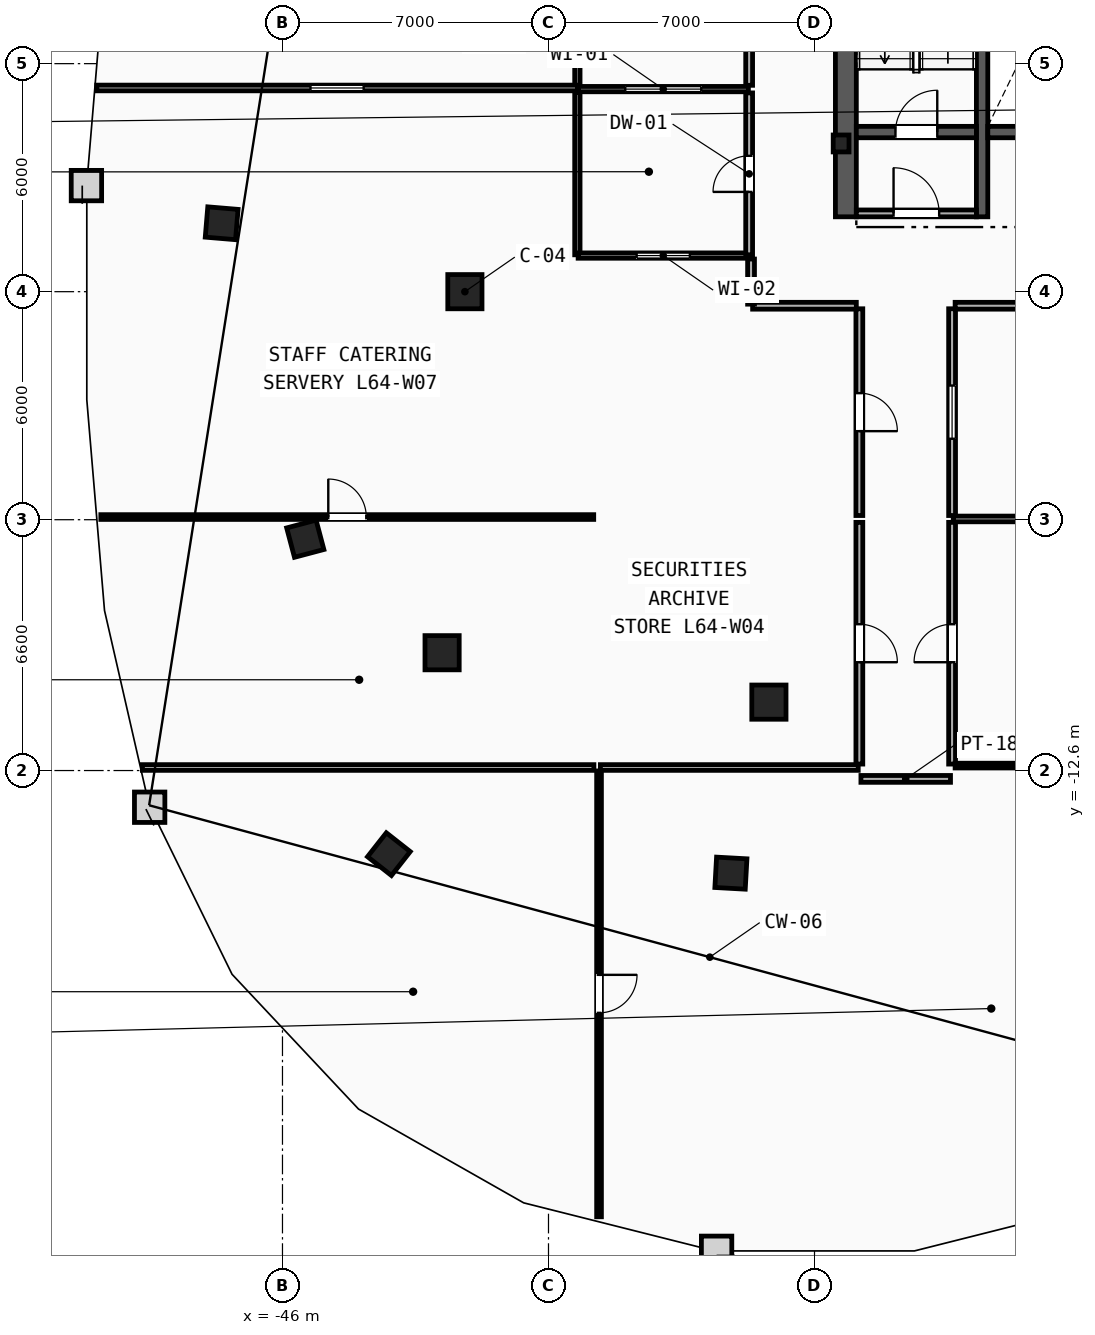
"""IFC4 building model, lengths in metres.
Left out: names, types, materials, properties, quantities, classifications, styles, units other than length and angle.
Written with IfcOpenShell. Run it as: python <this file> out.ifc"""

import sys

from ifc_helpers import new_model, si_unit, direction, frame, frame_2d, origin, origin_2d, place, context, subcontext, project, spatial, rectangle, i_section, extrude, element, fill, save


model = new_model("IFC4")
c1 = context("Model", 3, precision=1e-05, world=origin(), true_north=direction((0.0, 1.0)))
c2 = subcontext(c1, "Body", "Model", "MODEL_VIEW")
j1 = project(units=[si_unit("LENGTHUNIT", "METRE"), si_unit("PLANEANGLEUNIT", "RADIAN")], contexts=[c1])
p1 = place(None, origin())
s1 = spatial("IfcSite", under=j1, at=p1, CompositionType="ELEMENT")
p2 = place(p1, origin())
s2 = spatial("IfcBuilding", under=s1, at=p2, CompositionType="ELEMENT")
p3 = place(p2, frame((0.0, 0.0, 243.2)))
s3 = spatial("IfcBuildingStorey", under=s2, at=p3, CompositionType="ELEMENT", Elevation=243.2)
p4 = place(p3, frame((-31.3, 3.9, 0.0), z_axis=(0.0, 0.0, 1.0), x_axis=(1.0, 0.0, 0.0)))
e1 = element("IfcColumn", 1, at=p4, inside=s3, PredefinedType="COLUMN", context=c2, shape_type="SweptSolid", body=[
    extrude(i_section(OverallWidth=0.416, OverallDepth=0.446, WebThickness=0.039, FlangeThickness=0.063, FilletRadius=0.018, at=origin_2d()), origin(), (0.0, 0.0, 1.0), 3.6),
])
for number, where, z_axis, x_axis in (
    (2, (-41.2, 0.0, 0.0), (0.0, 0.0, 1.0), (1.0, 0.0, 0.0)),
    (3, (-41.8, -9.5, 0.0), (0.0, 0.0, 1.0), (1.0, 0.0, 0.0)),
    (4, (-33.2, -10.8, 0.0), (0.0, 0.0, 1.0), (1.0, 0.0, 0.0)),
):
    element("IfcColumn", number, at=place(p3, frame(where, z_axis=z_axis, x_axis=x_axis)), inside=s3, PredefinedType="COLUMN", context=c2, shape_type="SweptSolid", body=[
        extrude(rectangle(XDim=0.9, YDim=0.9, at=origin_2d()), origin(), (0.0, 0.0, 1.0), 3.6),
    ])
for number, where, z_axis, x_axis in (
    (5, (-47.6, 1.8, 0.0), (0.0, 0.0, 1.0), (-0.084, -0.997, 0.0)),
    (6, (-45.4, -6.5, 0.0), (0.0, 0.0, 1.0), (0.256, -0.967, 0.0)),
    (7, (-43.2, -14.8, 0.0), (0.0, 0.0, 1.0), (0.786, -0.618, 0.0)),
    (8, (-34.2, -15.3, 0.0), (0.0, 0.0, 1.0), (0.998, -0.055, 0.0)),
):
    element("IfcColumn", number, at=place(p3, frame(where, z_axis=z_axis, x_axis=x_axis)), inside=s3, PredefinedType="COLUMN", context=c2, shape_type="SweptSolid", body=[
        extrude(rectangle(XDim=0.8, YDim=0.8, at=origin_2d()), origin(), (0.0, 0.0, 1.0), 3.6),
    ])
p5 = place(p3, frame((-31.175, 1.97, 0.0), z_axis=(0.0, 0.0, 1.0), x_axis=(0.0, 1.0, 0.0)))
e9 = element("IfcWall", 9, at=p5, inside=s3, PredefinedType="SHEAR", context=c2, shape_type="SweptSolid", body=[
    extrude(rectangle(XDim=13.33, YDim=0.55, at=frame_2d((6.665, 0.0))), origin(), (0.0, 0.0, 1.0), 3.34),
])
p6 = place(p3, frame((-27.59, 1.97, 0.0), z_axis=(0.0, 0.0, 1.0), x_axis=(0.0, 1.0, 0.0)))
e10 = element("IfcWall", 10, at=p6, inside=s3, PredefinedType="SHEAR", context=c2, shape_type="SweptSolid", body=[
    extrude(rectangle(XDim=10.68, YDim=0.3, at=frame_2d((5.34, 0.0))), origin(), (0.0, 0.0, 1.0), 3.34),
])
p7 = place(p3, frame((-30.9, 4.2, 0.0), z_axis=(0.0, 0.0, 1.0), x_axis=(1.0, 0.0, 0.0)))
e11 = element("IfcWall", 11, at=p7, inside=s3, PredefinedType="SHEAR", context=c2, shape_type="SweptSolid", body=[
    extrude(rectangle(XDim=3.16, YDim=0.3, at=frame_2d((1.58, 0.0))), origin(), (0.0, 0.0, 1.0), 3.34),
])
p8 = place(p7, frame((1.03, 0.0, 0.0)))
e12 = element("IfcOpeningElement", 12, at=p8, cuts=e11, PredefinedType="OPENING", context=c2, shape_type="SweptSolid", body=[
    extrude(rectangle(XDim=1.1, YDim=2.15, at=frame_2d((0.55, 1.075))), frame((0.0, 0.16, 0.0), z_axis=(0.0, -1.0, 0.0), x_axis=(1.0, 0.0, 0.0)), (0.0, 0.0, 1.0), 0.32),
])
p9 = place(p3, frame((-27.44, 4.2, 0.0), z_axis=(0.0, 0.0, 1.0), x_axis=(1.0, 0.0, 0.0)))
e13 = element("IfcWall", 13, at=p9, inside=s3, PredefinedType="SHEAR", context=c2, shape_type="SweptSolid", body=[
    extrude(rectangle(XDim=3.16, YDim=0.3, at=frame_2d((1.58, 0.0))), origin(), (0.0, 0.0, 1.0), 3.34),
])
p10 = place(p3, frame((-30.9, 2.06, 0.0), z_axis=(0.0, 0.0, 1.0), x_axis=(1.0, 0.0, 0.0)))
e14 = element("IfcWall", 14, at=p10, inside=s3, PredefinedType="PARTITIONING", context=c2, shape_type="SweptSolid", body=[
    extrude(rectangle(XDim=3.16, YDim=0.18, at=frame_2d((1.58, 0.0))), origin(), (0.0, 0.0, 1.0), 3.34),
])
p11 = place(p10, frame((0.98, 0.0, 0.0)))
e15 = element("IfcOpeningElement", 15, at=p11, cuts=e14, PredefinedType="OPENING", context=c2, shape_type="SweptSolid", body=[
    extrude(rectangle(XDim=1.2, YDim=2.15, at=frame_2d((0.6, 1.075))), frame((0.0, 0.1, 0.0), z_axis=(0.0, -1.0, 0.0), x_axis=(1.0, 0.0, 0.0)), (0.0, 0.0, 1.0), 0.2),
])
p12 = place(p3, frame((-38.24, 0.97, 0.0), z_axis=(0.0, 0.0, 1.0), x_axis=(0.0, 1.0, 0.0)))
e16 = element("IfcWall", 16, at=p12, inside=s3, PredefinedType="PARTITIONING", context=c2, shape_type="SweptSolid", body=[
    extrude(rectangle(XDim=4.275, YDim=0.14, at=frame_2d((2.138, 0.0))), origin(), (0.0, 0.0, 1.0), 3.34),
])
p13 = place(p3, frame((-38.24, 5.415, 0.0), z_axis=(0.0, 0.0, 1.0), x_axis=(0.0, 1.0, 0.0)))
e17 = element("IfcWall", 17, at=p13, inside=s3, PredefinedType="PARTITIONING", context=c2, shape_type="SweptSolid", body=[
    extrude(rectangle(XDim=4.175, YDim=0.14, at=frame_2d((2.087, 0.0))), origin(), (0.0, 0.0, 1.0), 3.34),
])
p14 = place(p3, frame((-38.22, 0.95, 0.0), z_axis=(0.0, 0.0, 1.0), x_axis=(1.0, 0.0, 0.0)))
e18 = element("IfcWall", 18, at=p14, inside=s3, PredefinedType="PARTITIONING", context=c2, shape_type="SweptSolid", body=[
    extrude(rectangle(XDim=4.48, YDim=0.14, at=frame_2d((2.24, 0.0))), origin(), (0.0, 0.0, 1.0), 3.34),
])
p15 = place(p14, frame((1.54, 0.0, 1.05)))
e19 = element("IfcOpeningElement", 19, at=p15, cuts=e18, PredefinedType="OPENING", context=c2, shape_type="SweptSolid", body=[
    extrude(rectangle(XDim=1.4, YDim=1.5, at=frame_2d((0.7, 0.75))), frame((0.0, 0.08, 0.0), z_axis=(0.0, -1.0, 0.0), x_axis=(1.0, 0.0, 0.0)), (0.0, 0.0, 1.0), 0.16),
])
p16 = place(p3, frame((-38.22, 5.33, 0.0), z_axis=(0.0, 0.0, 1.0), x_axis=(1.0, 0.0, 0.0)))
e20 = element("IfcWall", 20, at=p16, inside=s3, PredefinedType="PARTITIONING", context=c2, shape_type="SweptSolid", body=[
    extrude(rectangle(XDim=4.48, YDim=0.14, at=frame_2d((2.24, 0.0))), origin(), (0.0, 0.0, 1.0), 3.34),
])
p17 = place(p16, frame((1.24, 0.0, 1.05)))
e21 = element("IfcOpeningElement", 21, at=p17, cuts=e20, PredefinedType="OPENING", context=c2, shape_type="SweptSolid", body=[
    extrude(rectangle(XDim=2.0, YDim=1.5, at=frame_2d((1.0, 0.75))), frame((0.0, 0.08, 0.0), z_axis=(0.0, -1.0, 0.0), x_axis=(1.0, 0.0, 0.0)), (0.0, 0.0, 1.0), 0.16),
])
p18 = place(p3, frame((-33.72, 0.97, 0.0), z_axis=(0.0, 0.0, 1.0), x_axis=(0.0, 1.0, 0.0)))
e22 = element("IfcWall", 22, at=p18, inside=s3, PredefinedType="PARTITIONING", context=c2, shape_type="SweptSolid", body=[
    extrude(rectangle(XDim=4.26, YDim=0.18, at=frame_2d((2.13, 0.0))), origin(), (0.0, 0.0, 1.0), 3.34),
])
p19 = place(p18, frame((1.655, 0.0, 0.0)))
e23 = element("IfcOpeningElement", 23, at=p19, cuts=e22, PredefinedType="OPENING", context=c2, shape_type="SweptSolid", body=[
    extrude(rectangle(XDim=0.95, YDim=2.1, at=frame_2d((0.475, 1.05))), frame((0.0, 0.1, 0.0), z_axis=(0.0, -1.0, 0.0), x_axis=(1.0, 0.0, 0.0)), (0.0, 0.0, 1.0), 0.2),
])
p20 = place(p3, frame((-33.72, 5.43, 0.0), z_axis=(0.0, 0.0, 1.0), x_axis=(0.0, 1.0, 0.0)))
e24 = element("IfcWall", 24, at=p20, inside=s3, PredefinedType="PARTITIONING", context=c2, shape_type="SweptSolid", body=[
    extrude(rectangle(XDim=4.16, YDim=0.18, at=frame_2d((2.08, 0.0))), origin(), (0.0, 0.0, 1.0), 3.34),
])
p21 = place(p20, frame((1.58, 0.0, 0.0)))
e25 = element("IfcOpeningElement", 25, at=p21, cuts=e24, PredefinedType="OPENING", context=c2, shape_type="SweptSolid", body=[
    extrude(rectangle(XDim=1.0, YDim=2.15, at=frame_2d((0.5, 1.075))), frame((0.0, 0.1, 0.0), z_axis=(0.0, -1.0, 0.0), x_axis=(1.0, 0.0, 0.0)), (0.0, 0.0, 1.0), 0.2),
])
p22 = place(p3, frame((-28.35, -5.98, 0.0), z_axis=(0.0, 0.0, 1.0), x_axis=(1.0, 0.0, 0.0)))
e26 = element("IfcWall", 26, at=p22, inside=s3, PredefinedType="PARTITIONING", context=c2, shape_type="SweptSolid", body=[
    extrude(rectangle(XDim=15.185, YDim=0.15, at=frame_2d((7.593, 0.0))), origin(), (0.0, 0.0, 1.0), 3.34),
])
p23 = place(p3, frame((-49.686, -12.52, 0.0), z_axis=(0.0, 0.0, 1.0), x_axis=(1.0, 0.0, 0.0)))
e27 = element("IfcWall", 27, at=p23, inside=s3, PredefinedType="PARTITIONING", context=c2, shape_type="SweptSolid", body=[
    extrude(rectangle(XDim=11.881, YDim=0.15, at=frame_2d((5.94, 0.0))), origin(), (0.0, 0.0, 1.0), 3.34),
])
p24 = place(p3, frame((-37.635, -12.52, 0.0), z_axis=(0.0, 0.0, 1.0), x_axis=(1.0, 0.0, 0.0)))
e28 = element("IfcWall", 28, at=p24, inside=s3, PredefinedType="PARTITIONING", context=c2, shape_type="SweptSolid", body=[
    extrude(rectangle(XDim=6.785, YDim=0.15, at=frame_2d((3.393, 0.0))), origin(), (0.0, 0.0, 1.0), 3.34),
])
p25 = place(p3, frame((-50.887, 5.36, 0.0), z_axis=(0.0, 0.0, 1.0), x_axis=(1.0, 0.0, 0.0)))
e29 = element("IfcWall", 29, at=p25, inside=s3, PredefinedType="PARTITIONING", context=c2, shape_type="SweptSolid", body=[
    extrude(rectangle(XDim=12.648, YDim=0.15, at=frame_2d((6.324, 0.0))), origin(), (0.0, 0.0, 1.0), 3.34),
])
p26 = place(p25, frame((5.624, 0.0, 1.05)))
e30 = element("IfcOpeningElement", 30, at=p26, cuts=e29, PredefinedType="OPENING", context=c2, shape_type="SweptSolid", body=[
    extrude(rectangle(XDim=1.4, YDim=1.5, at=frame_2d((0.7, 0.75))), frame((0.0, 0.085, 0.0), z_axis=(0.0, -1.0, 0.0), x_axis=(1.0, 0.0, 0.0)), (0.0, 0.0, 1.0), 0.17),
])
p27 = place(p3, frame((-30.779, -12.82, 0.0), z_axis=(0.0, 0.0, 1.0), x_axis=(1.0, 0.0, 0.0)))
e31 = element("IfcWall", 31, at=p27, inside=s3, PredefinedType="PARTITIONING", context=c2, shape_type="SweptSolid", body=[
    extrude(rectangle(XDim=2.357, YDim=0.18, at=frame_2d((1.179, 0.0))), origin(), (0.0, 0.0, 1.0), 3.34),
])
p28 = place(p3, frame((-30.82, -6.07, 0.0), z_axis=(0.0, 0.0, 1.0), x_axis=(0.0, -1.0, 0.0)))
e32 = element("IfcWall", 32, at=p28, inside=s3, PredefinedType="PARTITIONING", context=c2, shape_type="SweptSolid", body=[
    extrude(rectangle(XDim=6.36, YDim=0.18, at=frame_2d((3.18, 0.0))), origin(), (0.0, 0.0, 1.0), 3.34),
])
p29 = place(p28, frame((2.68, 0.0, 0.0)))
e33 = element("IfcOpeningElement", 33, at=p29, cuts=e32, PredefinedType="OPENING", context=c2, shape_type="SweptSolid", body=[
    extrude(rectangle(XDim=1.0, YDim=2.15, at=frame_2d((0.5, 1.075))), frame((0.0, 0.1, 0.0), z_axis=(0.0, -1.0, 0.0), x_axis=(1.0, 0.0, 0.0)), (0.0, 0.0, 1.0), 0.2),
])
p30 = place(p3, frame((-28.38, -12.43, 0.0), z_axis=(0.0, 0.0, 1.0), x_axis=(0.0, 1.0, 0.0)))
e34 = element("IfcWall", 34, at=p30, inside=s3, PredefinedType="PARTITIONING", context=c2, shape_type="SweptSolid", body=[
    extrude(rectangle(XDim=6.36, YDim=0.18, at=frame_2d((3.18, 0.0))), origin(), (0.0, 0.0, 1.0), 3.34),
])
p31 = place(p30, frame((2.68, 0.0, 0.0)))
e35 = element("IfcOpeningElement", 35, at=p31, cuts=e34, PredefinedType="OPENING", context=c2, shape_type="SweptSolid", body=[
    extrude(rectangle(XDim=1.0, YDim=2.15, at=frame_2d((0.5, 1.075))), frame((0.0, 0.1, 0.0), z_axis=(0.0, -1.0, 0.0), x_axis=(1.0, 0.0, 0.0)), (0.0, 0.0, 1.0), 0.2),
])
p32 = place(p3, frame((-28.3, -0.37, 0.0), z_axis=(0.0, 0.0, 1.0), x_axis=(1.0, 0.0, 0.0)))
e36 = element("IfcWall", 36, at=p32, inside=s3, PredefinedType="PARTITIONING", context=c2, shape_type="SweptSolid", body=[
    extrude(rectangle(XDim=15.349, YDim=0.18, at=frame_2d((7.675, 0.0))), origin(), (0.0, 0.0, 1.0), 3.34),
])
p33 = place(p32, frame((7.175, 0.0, 0.0)))
e37 = element("IfcOpeningElement", 37, at=p33, cuts=e36, PredefinedType="OPENING", context=c2, shape_type="SweptSolid", body=[
    extrude(rectangle(XDim=1.0, YDim=2.15, at=frame_2d((0.5, 1.075))), frame((0.0, 0.1, 0.0), z_axis=(0.0, -1.0, 0.0), x_axis=(1.0, 0.0, 0.0)), (0.0, 0.0, 1.0), 0.2),
])
p34 = place(p3, frame((-28.38, -5.89, 0.0), z_axis=(0.0, 0.0, 1.0), x_axis=(0.0, 1.0, 0.0)))
e38 = element("IfcWall", 38, at=p34, inside=s3, PredefinedType="PARTITIONING", context=c2, shape_type="SweptSolid", body=[
    extrude(rectangle(XDim=5.44, YDim=0.18, at=frame_2d((2.72, 0.0))), origin(), (0.0, 0.0, 1.0), 3.34),
])
p35 = place(p34, frame((2.02, 0.0, 1.05)))
e39 = element("IfcOpeningElement", 39, at=p35, cuts=e38, PredefinedType="OPENING", context=c2, shape_type="SweptSolid", body=[
    extrude(rectangle(XDim=1.4, YDim=1.5, at=frame_2d((0.7, 0.75))), frame((0.0, 0.1, 0.0), z_axis=(0.0, -1.0, 0.0), x_axis=(1.0, 0.0, 0.0)), (0.0, 0.0, 1.0), 0.2),
])
p36 = place(p3, frame((-30.82, -0.45, 0.0), z_axis=(0.0, 0.0, 1.0), x_axis=(0.0, -1.0, 0.0)))
e40 = element("IfcWall", 40, at=p36, inside=s3, PredefinedType="PARTITIONING", context=c2, shape_type="SweptSolid", body=[
    extrude(rectangle(XDim=5.44, YDim=0.18, at=frame_2d((2.72, 0.0))), origin(), (0.0, 0.0, 1.0), 3.34),
])
p37 = place(p36, frame((2.22, 0.0, 0.0)))
e41 = element("IfcOpeningElement", 41, at=p37, cuts=e40, PredefinedType="OPENING", context=c2, shape_type="SweptSolid", body=[
    extrude(rectangle(XDim=1.0, YDim=2.15, at=frame_2d((0.5, 1.075))), frame((0.0, 0.1, 0.0), z_axis=(0.0, -1.0, 0.0), x_axis=(1.0, 0.0, 0.0)), (0.0, 0.0, 1.0), 0.2),
])
p38 = place(p3, frame((-33.628, -0.37, 0.0), z_axis=(0.0, 0.0, 1.0), x_axis=(1.0, 0.0, 0.0)))
e42 = element("IfcWall", 42, at=p38, inside=s3, PredefinedType="PARTITIONING", context=c2, shape_type="SweptSolid", body=[
    extrude(rectangle(XDim=2.729, YDim=0.18, at=frame_2d((1.364, 0.0))), origin(), (0.0, 0.0, 1.0), 3.34),
])
p39 = place(p3, frame((-33.67, 0.859, 0.0), z_axis=(0.0, 0.0, 1.0), x_axis=(0.0, -1.0, 0.0)))
e43 = element("IfcWall", 43, at=p39, inside=s3, PredefinedType="PARTITIONING", context=c2, shape_type="SweptSolid", body=[
    extrude(rectangle(XDim=1.187, YDim=0.18, at=frame_2d((0.594, 0.0))), origin(), (0.0, 0.0, 1.0), 3.34),
])
p40 = place(p3, frame((-28.3, -12.47, 0.0), z_axis=(0.0, 0.0, 1.0), x_axis=(1.0, 0.0, 0.0)))
e44 = element("IfcWall", 44, at=p40, inside=s3, PredefinedType="PARTITIONING", context=c2, shape_type="SweptSolid", body=[
    extrude(rectangle(XDim=13.919, YDim=0.125, at=frame_2d((6.959, 0.0))), origin(), (0.0, 0.0, 1.0), 3.34),
])
p41 = place(p40, frame((6.459, 0.0, 0.0)))
e45 = element("IfcOpeningElement", 45, at=p41, cuts=e44, PredefinedType="OPENING", context=c2, shape_type="SweptSolid", body=[
    extrude(rectangle(XDim=1.0, YDim=2.15, at=frame_2d((0.5, 1.075))), frame((0.0, 0.073, 0.0), z_axis=(0.0, -1.0, 0.0), x_axis=(1.0, 0.0, 0.0)), (0.0, 0.0, 1.0), 0.145),
])
p42 = place(p3, frame((-37.67, -12.61, 0.0), z_axis=(0.0, 0.0, 1.0), x_axis=(0.0, -1.0, 0.0)))
e46 = element("IfcWall", 46, at=p42, inside=s3, PredefinedType="PARTITIONING", context=c2, shape_type="SweptSolid", body=[
    extrude(rectangle(XDim=11.731, YDim=0.125, at=frame_2d((5.866, 0.0))), origin(), (0.0, 0.0, 1.0), 3.34),
])
p43 = place(p42, frame((5.366, 0.0, 0.0)))
e47 = element("IfcOpeningElement", 47, at=p43, cuts=e46, PredefinedType="OPENING", context=c2, shape_type="SweptSolid", body=[
    extrude(rectangle(XDim=1.0, YDim=2.15, at=frame_2d((0.5, 1.075))), frame((0.0, 0.073, 0.0), z_axis=(0.0, -1.0, 0.0), x_axis=(1.0, 0.0, 0.0)), (0.0, 0.0, 1.0), 0.145),
])
p44 = place(p3, frame((-50.779, -5.93, 0.0), z_axis=(0.0, 0.0, 1.0), x_axis=(1.0, 0.0, 0.0)))
e48 = element("IfcWall", 48, at=p44, inside=s3, PredefinedType="PARTITIONING", context=c2, shape_type="SweptSolid", body=[
    extrude(rectangle(XDim=12.969, YDim=0.125, at=frame_2d((6.485, 0.0))), origin(), (0.0, 0.0, 1.0), 3.34),
])
p45 = place(p44, frame((5.985, 0.0, 0.0)))
e49 = element("IfcOpeningElement", 49, at=p45, cuts=e48, PredefinedType="OPENING", context=c2, shape_type="SweptSolid", body=[
    extrude(rectangle(XDim=1.0, YDim=2.15, at=frame_2d((0.5, 1.075))), frame((0.0, 0.073, 0.0), z_axis=(0.0, -1.0, 0.0), x_axis=(1.0, 0.0, 0.0)), (0.0, 0.0, 1.0), 0.145),
])
p46 = place(p8, origin())
e50 = element("IfcDoor", 50, at=p46, inside=s3, OperationType="SINGLE_SWING_RIGHT", PredefinedType="DOOR", context=c2, shape_type="SweptSolid", body=[
    extrude(rectangle(XDim=1.1, YDim=2.15, at=frame_2d((0.55, 1.075))), frame((0.0, 0.025, 0.0), z_axis=(0.0, -1.0, 0.0), x_axis=(1.0, 0.0, 0.0)), (0.0, 0.0, 1.0), 0.05),
])
fill(e12, e50)
p47 = place(p11, origin())
e51 = element("IfcDoor", 51, at=p47, inside=s3, OperationType="SINGLE_SWING_LEFT", PredefinedType="DOOR", context=c2, shape_type="SweptSolid", body=[
    extrude(rectangle(XDim=1.2, YDim=2.15, at=frame_2d((0.6, 1.075))), frame((0.0, 0.025, 0.0), z_axis=(0.0, -1.0, 0.0), x_axis=(1.0, 0.0, 0.0)), (0.0, 0.0, 1.0), 0.05),
])
fill(e15, e51)
p48 = place(p45, origin())
e52 = element("IfcDoor", 52, at=p48, inside=s3, OperationType="SINGLE_SWING_LEFT", PredefinedType="DOOR", context=c2, shape_type="SweptSolid", body=[
    extrude(rectangle(XDim=1.0, YDim=2.15, at=frame_2d((0.5, 1.075))), frame((0.0, 0.025, 0.0), z_axis=(0.0, -1.0, 0.0), x_axis=(1.0, 0.0, 0.0)), (0.0, 0.0, 1.0), 0.05),
])
fill(e49, e52)
p49 = place(p43, origin())
e53 = element("IfcDoor", 53, at=p49, inside=s3, OperationType="SINGLE_SWING_LEFT", PredefinedType="DOOR", context=c2, shape_type="SweptSolid", body=[
    extrude(rectangle(XDim=1.0, YDim=2.15, at=frame_2d((0.5, 1.075))), frame((0.0, 0.025, 0.0), z_axis=(0.0, -1.0, 0.0), x_axis=(1.0, 0.0, 0.0)), (0.0, 0.0, 1.0), 0.05),
])
fill(e47, e53)
p50 = place(p29, origin())
e54 = element("IfcDoor", 54, at=p50, inside=s3, OperationType="SINGLE_SWING_RIGHT", PredefinedType="DOOR", context=c2, shape_type="SweptSolid", body=[
    extrude(rectangle(XDim=1.0, YDim=2.15, at=frame_2d((0.5, 1.075))), frame((0.0, 0.025, 0.0), z_axis=(0.0, -1.0, 0.0), x_axis=(1.0, 0.0, 0.0)), (0.0, 0.0, 1.0), 0.05),
])
fill(e33, e54)
p51 = place(p31, origin())
e55 = element("IfcDoor", 55, at=p51, inside=s3, OperationType="SINGLE_SWING_LEFT", PredefinedType="DOOR", context=c2, shape_type="SweptSolid", body=[
    extrude(rectangle(XDim=1.0, YDim=2.15, at=frame_2d((0.5, 1.075))), frame((0.0, 0.025, 0.0), z_axis=(0.0, -1.0, 0.0), x_axis=(1.0, 0.0, 0.0)), (0.0, 0.0, 1.0), 0.05),
])
fill(e35, e55)
p52 = place(p37, origin())
e56 = element("IfcDoor", 56, at=p52, inside=s3, OperationType="SINGLE_SWING_RIGHT", PredefinedType="DOOR", context=c2, shape_type="SweptSolid", body=[
    extrude(rectangle(XDim=1.0, YDim=2.15, at=frame_2d((0.5, 1.075))), frame((0.0, 0.025, 0.0), z_axis=(0.0, -1.0, 0.0), x_axis=(1.0, 0.0, 0.0)), (0.0, 0.0, 1.0), 0.05),
])
fill(e41, e56)
p53 = place(p19, origin())
e57 = element("IfcDoor", 57, at=p53, inside=s3, OperationType="SINGLE_SWING_LEFT", PredefinedType="DOOR", context=c2, shape_type="SweptSolid", body=[
    extrude(rectangle(XDim=0.95, YDim=2.1, at=frame_2d((0.475, 1.05))), frame((0.0, 0.025, 0.0), z_axis=(0.0, -1.0, 0.0), x_axis=(1.0, 0.0, 0.0)), (0.0, 0.0, 1.0), 0.05),
])
fill(e23, e57)
p54 = place(p15, origin())
e58 = element("IfcWindow", 58, at=p54, inside=s3, PartitioningType="SINGLE_PANEL", PredefinedType="WINDOW", context=c2, shape_type="SweptSolid", body=[
    extrude(rectangle(XDim=1.4, YDim=1.5, at=frame_2d((0.7, 0.75))), frame((0.0, 0.03, 0.0), z_axis=(0.0, -1.0, 0.0), x_axis=(1.0, 0.0, 0.0)), (0.0, 0.0, 1.0), 0.06),
])
fill(e19, e58)
p55 = place(p17, origin())
e59 = element("IfcWindow", 59, at=p55, inside=s3, PartitioningType="SINGLE_PANEL", PredefinedType="WINDOW", context=c2, shape_type="SweptSolid", body=[
    extrude(rectangle(XDim=2.0, YDim=1.5, at=frame_2d((1.0, 0.75))), frame((0.0, 0.03, 0.0), z_axis=(0.0, -1.0, 0.0), x_axis=(1.0, 0.0, 0.0)), (0.0, 0.0, 1.0), 0.06),
])
fill(e21, e59)
p56 = place(p26, origin())
e60 = element("IfcWindow", 60, at=p56, inside=s3, PartitioningType="SINGLE_PANEL", PredefinedType="WINDOW", context=c2, shape_type="SweptSolid", body=[
    extrude(rectangle(XDim=1.4, YDim=1.5, at=frame_2d((0.7, 0.75))), frame((0.0, 0.03, 0.0), z_axis=(0.0, -1.0, 0.0), x_axis=(1.0, 0.0, 0.0)), (0.0, 0.0, 1.0), 0.06),
])
fill(e30, e60)
p57 = place(p35, origin())
e61 = element("IfcWindow", 61, at=p57, inside=s3, PartitioningType="SINGLE_PANEL", PredefinedType="WINDOW", context=c2, shape_type="SweptSolid", body=[
    extrude(rectangle(XDim=1.4, YDim=1.5, at=frame_2d((0.7, 0.75))), frame((0.0, 0.03, 0.0), z_axis=(0.0, -1.0, 0.0), x_axis=(1.0, 0.0, 0.0)), (0.0, 0.0, 1.0), 0.06),
])
fill(e39, e61)
save(model, sys.argv[1])
